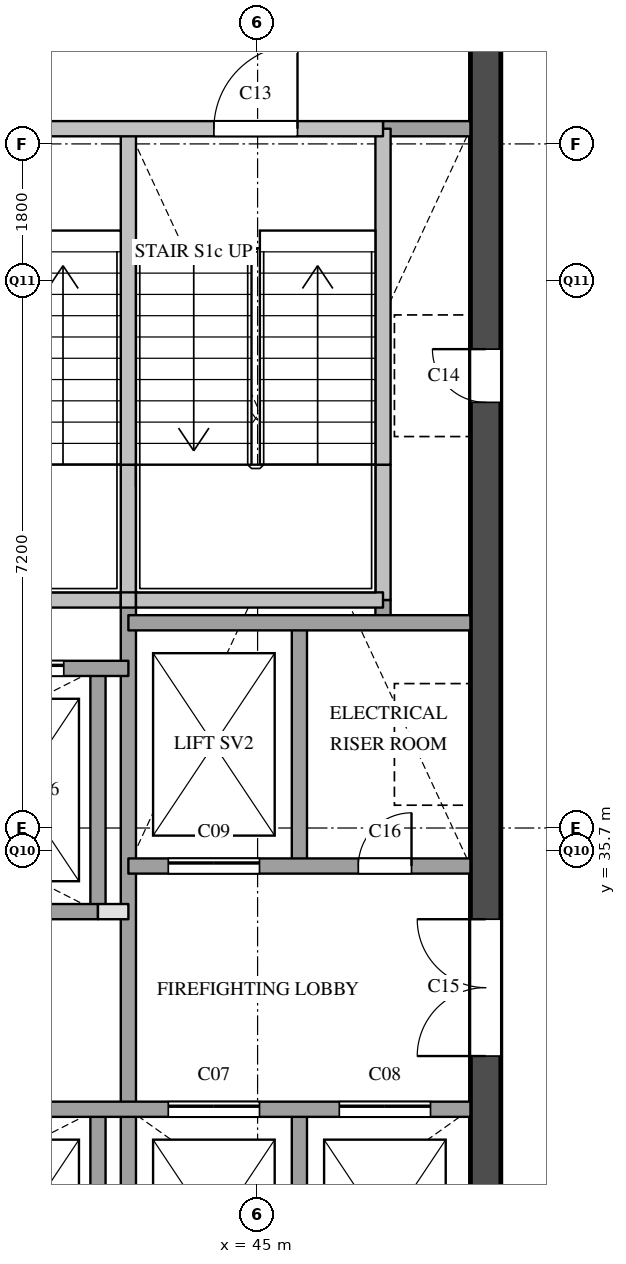
"""IFC4 building model, lengths in metres.
Left out: names, types, materials, properties, quantities, classifications, styles, units other than length and angle.
Written with IfcOpenShell. Run it as: python <this file> out.ifc"""

import sys

from ifc_helpers import new_model, si_unit, direction, frame, frame_2d, origin, place, context, subcontext, project, spatial, rectangle, extrude, element, fill, save


model = new_model("IFC4")
c1 = context("Model", 3, precision=1e-05, world=origin(), true_north=direction((0.0, 1.0)))
c2 = subcontext(c1, "Body", "Model", "MODEL_VIEW")
j1 = project(units=[si_unit("LENGTHUNIT", "METRE"), si_unit("PLANEANGLEUNIT", "RADIAN")], contexts=[c1])
p1 = place(None, origin())
s1 = spatial("IfcSite", under=j1, at=p1, CompositionType="ELEMENT")
p2 = place(p1, origin())
s2 = spatial("IfcBuilding", under=s1, at=p2, CompositionType="ELEMENT")
p3 = place(p2, frame((0.0, 0.0, 273.5)))
s3 = spatial("IfcBuildingStorey", under=s2, at=p3, CompositionType="ELEMENT", Elevation=273.5)
p4 = place(p3, frame((48.0, 29.1, 0.0), z_axis=(0.0, 0.0, 1.0), x_axis=(0.0, 1.0, 0.0)))
e1 = element("IfcWall", 1, at=p4, inside=s3, PredefinedType="SHEAR", context=c2, shape_type="SweptSolid", body=[
    extrude(rectangle(XDim=20.3, YDim=0.4, at=frame_2d((10.15, 0.0))), origin(), (0.0, 0.0, 1.0), 3.6),
])
p5 = place(p4, frame((12.5, 0.0, 0.0)))
e2 = element("IfcOpeningElement", 2, at=p5, cuts=e1, PredefinedType="OPENING", context=c2, shape_type="SweptSolid", body=[
    extrude(rectangle(XDim=0.7, YDim=2.1, at=frame_2d((0.35, 1.05))), frame((0.0, 0.21, 0.0), z_axis=(0.0, -1.0, 0.0), x_axis=(1.0, 0.0, 0.0)), (0.0, 0.0, 1.0), 0.42),
])
p6 = place(p4, frame((3.9, 0.0, 0.0)))
e3 = element("IfcOpeningElement", 3, at=p6, cuts=e1, PredefinedType="OPENING", context=c2, shape_type="SweptSolid", body=[
    extrude(rectangle(XDim=1.8, YDim=2.1, at=frame_2d((0.9, 1.05))), frame((0.0, 0.21, 0.0), z_axis=(0.0, -1.0, 0.0), x_axis=(1.0, 0.0, 0.0)), (0.0, 0.0, 1.0), 0.42),
])
p7 = place(p3, frame((42.9, 29.1, 0.0), z_axis=(0.0, 0.0, 1.0), x_axis=(0.0, 1.0, 0.0)))
e4 = element("IfcWall", 4, at=p7, inside=s3, PredefinedType="SOLIDWALL", context=c2, shape_type="SweptSolid", body=[
    extrude(rectangle(XDim=3.2, YDim=0.2, at=frame_2d((1.6, 0.0))), origin(), (0.0, 0.0, 1.0), 3.6),
])
p8 = place(p3, frame((42.9, 34.9, 0.0), z_axis=(0.0, 0.0, 1.0), x_axis=(0.0, 1.0, 0.0)))
e5 = element("IfcWall", 5, at=p8, inside=s3, PredefinedType="SOLIDWALL", context=c2, shape_type="SweptSolid", body=[
    extrude(rectangle(XDim=3.2, YDim=0.2, at=frame_2d((1.6, 0.0))), origin(), (0.0, 0.0, 1.0), 3.6),
])
p9 = place(p3, frame((43.3, 29.1, 0.0), z_axis=(0.0, 0.0, 1.0), x_axis=(0.0, 1.0, 0.0)))
e6 = element("IfcWall", 6, at=p9, inside=s3, PredefinedType="SOLIDWALL", context=c2, shape_type="SweptSolid", body=[
    extrude(rectangle(XDim=9.9, YDim=0.2, at=frame_2d((4.95, 0.0))), origin(), (0.0, 0.0, 1.0), 3.6),
])
p10 = place(p3, frame((43.3, 39.0, 0.0), z_axis=(0.0, 0.0, 1.0), x_axis=(0.0, 1.0, 0.0)))
e7 = element("IfcWall", 7, at=p10, inside=s3, PredefinedType="SOLIDWALL", context=c2, shape_type="SweptSolid", body=[
    extrude(rectangle(XDim=1.78, YDim=0.2, at=frame_2d((0.89, 0.0))), origin(), (0.0, 0.0, 1.0), 3.6),
])
p11 = place(p3, frame((43.3, 40.78, 0.0), z_axis=(0.0, 0.0, 1.0), x_axis=(0.0, 1.0, 0.0)))
e8 = element("IfcWall", 8, at=p11, inside=s3, PredefinedType="SOLIDWALL", context=c2, shape_type="SweptSolid", body=[
    extrude(rectangle(XDim=4.42, YDim=0.2, at=frame_2d((2.21, 0.0))), origin(), (0.0, 0.0, 1.0), 3.6),
])
for number, where, z_axis, x_axis in (
    (9, (45.55, 29.1, 0.0), (0.0, 0.0, 1.0), (0.0, 1.0, 0.0)),
    (10, (45.55, 35.5, 0.0), (0.0, 0.0, 1.0), (0.0, 1.0, 0.0)),
):
    element("IfcWall", number, at=place(p3, frame(where, z_axis=z_axis, x_axis=x_axis)), inside=s3, PredefinedType="SOLIDWALL", context=c2, shape_type="SweptSolid", body=[
        extrude(rectangle(XDim=3.2, YDim=0.2, at=frame_2d((1.6, 0.0))), origin(), (0.0, 0.0, 1.0), 3.6),
    ])
p12 = place(p3, frame((46.65, 38.7, 0.0), z_axis=(0.0, 0.0, 1.0), x_axis=(0.0, 1.0, 0.0)))
e11 = element("IfcWall", 11, at=p12, inside=s3, PredefinedType="SOLIDWALL", context=c2, shape_type="SweptSolid", body=[
    extrude(rectangle(XDim=0.3, YDim=0.2, at=frame_2d((0.15, 0.0))), origin(), (0.0, 0.0, 1.0), 3.6),
])
p13 = place(p3, frame((46.65, 39.0, 0.0), z_axis=(0.0, 0.0, 1.0), x_axis=(0.0, 1.0, 0.0)))
e12 = element("IfcWall", 12, at=p13, inside=s3, PredefinedType="SOLIDWALL", context=c2, shape_type="SweptSolid", body=[
    extrude(rectangle(XDim=1.78, YDim=0.2, at=frame_2d((0.89, 0.0))), origin(), (0.0, 0.0, 1.0), 3.6),
])
p14 = place(p3, frame((46.65, 40.78, 0.0), z_axis=(0.0, 0.0, 1.0), x_axis=(0.0, 1.0, 0.0)))
e13 = element("IfcWall", 13, at=p14, inside=s3, PredefinedType="SOLIDWALL", context=c2, shape_type="SweptSolid", body=[
    extrude(rectangle(XDim=4.42, YDim=0.2, at=frame_2d((2.21, 0.0))), origin(), (0.0, 0.0, 1.0), 3.6),
])
p15 = place(p3, frame((36.6, 32.3, 0.0), z_axis=(0.0, 0.0, 1.0), x_axis=(1.0, 0.0, 0.0)))
e14 = element("IfcWall", 14, at=p15, inside=s3, PredefinedType="SOLIDWALL", context=c2, shape_type="SweptSolid", body=[
    extrude(rectangle(XDim=11.2, YDim=0.2, at=frame_2d((5.6, 0.0))), origin(), (0.0, 0.0, 1.0), 3.6),
])
p16 = place(p15, frame((7.225, 0.0, 0.0)))
e15 = element("IfcOpeningElement", 15, at=p16, cuts=e14, PredefinedType="OPENING", context=c2, shape_type="SweptSolid", body=[
    extrude(rectangle(XDim=1.2, YDim=2.1, at=frame_2d((0.6, 1.05))), frame((0.0, 0.11, 0.0), z_axis=(0.0, -1.0, 0.0), x_axis=(1.0, 0.0, 0.0)), (0.0, 0.0, 1.0), 0.22),
])
p17 = place(p15, frame((9.475, 0.0, 0.0)))
e16 = element("IfcOpeningElement", 16, at=p17, cuts=e14, PredefinedType="OPENING", context=c2, shape_type="SweptSolid", body=[
    extrude(rectangle(XDim=1.2, YDim=2.1, at=frame_2d((0.6, 1.05))), frame((0.0, 0.11, 0.0), z_axis=(0.0, -1.0, 0.0), x_axis=(1.0, 0.0, 0.0)), (0.0, 0.0, 1.0), 0.22),
])
p18 = place(p3, frame((42.9, 34.9, 0.0), z_axis=(0.0, 0.0, 1.0), x_axis=(1.0, 0.0, 0.0)))
e17 = element("IfcWall", 17, at=p18, inside=s3, PredefinedType="PARTITIONING", context=c2, shape_type="SweptSolid", body=[
    extrude(rectangle(XDim=0.4, YDim=0.2, at=frame_2d((0.2, 0.0))), origin(), (0.0, 0.0, 1.0), 3.6),
])
p19 = place(p3, frame((36.6, 34.9, 0.0), z_axis=(0.0, 0.0, 1.0), x_axis=(1.0, 0.0, 0.0)))
e18 = element("IfcWall", 18, at=p19, inside=s3, PredefinedType="SOLIDWALL", context=c2, shape_type="SweptSolid", body=[
    extrude(rectangle(XDim=6.3, YDim=0.2, at=frame_2d((3.15, 0.0))), origin(), (0.0, 0.0, 1.0), 3.6),
])
p20 = place(p3, frame((43.3, 35.5, 0.0), z_axis=(0.0, 0.0, 1.0), x_axis=(1.0, 0.0, 0.0)))
e19 = element("IfcWall", 19, at=p20, inside=s3, PredefinedType="SOLIDWALL", context=c2, shape_type="SweptSolid", body=[
    extrude(rectangle(XDim=4.5, YDim=0.2, at=frame_2d((2.25, 0.0))), origin(), (0.0, 0.0, 1.0), 3.6),
])
p21 = place(p20, frame((0.525, 0.0, 0.0)))
e20 = element("IfcOpeningElement", 20, at=p21, cuts=e19, PredefinedType="OPENING", context=c2, shape_type="SweptSolid", body=[
    extrude(rectangle(XDim=1.2, YDim=2.1, at=frame_2d((0.6, 1.05))), frame((0.0, 0.11, 0.0), z_axis=(0.0, -1.0, 0.0), x_axis=(1.0, 0.0, 0.0)), (0.0, 0.0, 1.0), 0.22),
])
p22 = place(p20, frame((3.025, 0.0, 0.0)))
e21 = element("IfcOpeningElement", 21, at=p22, cuts=e19, PredefinedType="OPENING", context=c2, shape_type="SweptSolid", body=[
    extrude(rectangle(XDim=0.7, YDim=2.1, at=frame_2d((0.35, 1.05))), frame((0.0, 0.11, 0.0), z_axis=(0.0, -1.0, 0.0), x_axis=(1.0, 0.0, 0.0)), (0.0, 0.0, 1.0), 0.22),
])
p23 = place(p3, frame((36.6, 38.1, 0.0), z_axis=(0.0, 0.0, 1.0), x_axis=(1.0, 0.0, 0.0)))
e22 = element("IfcWall", 22, at=p23, inside=s3, PredefinedType="SOLIDWALL", context=c2, shape_type="SweptSolid", body=[
    extrude(rectangle(XDim=6.7, YDim=0.2, at=frame_2d((3.35, 0.0))), origin(), (0.0, 0.0, 1.0), 3.6),
])
p24 = place(p23, frame((0.45, 0.0, 0.0)))
e23 = element("IfcOpeningElement", 23, at=p24, cuts=e22, PredefinedType="OPENING", context=c2, shape_type="SweptSolid", body=[
    extrude(rectangle(XDim=1.2, YDim=2.1, at=frame_2d((0.6, 1.05))), frame((0.0, 0.11, 0.0), z_axis=(0.0, -1.0, 0.0), x_axis=(1.0, 0.0, 0.0)), (0.0, 0.0, 1.0), 0.22),
])
p25 = place(p23, frame((2.55, 0.0, 0.0)))
e24 = element("IfcOpeningElement", 24, at=p25, cuts=e22, PredefinedType="OPENING", context=c2, shape_type="SweptSolid", body=[
    extrude(rectangle(XDim=1.2, YDim=2.1, at=frame_2d((0.6, 1.05))), frame((0.0, 0.11, 0.0), z_axis=(0.0, -1.0, 0.0), x_axis=(1.0, 0.0, 0.0)), (0.0, 0.0, 1.0), 0.22),
])
p26 = place(p23, frame((4.65, 0.0, 0.0)))
e25 = element("IfcOpeningElement", 25, at=p26, cuts=e22, PredefinedType="OPENING", context=c2, shape_type="SweptSolid", body=[
    extrude(rectangle(XDim=1.2, YDim=2.1, at=frame_2d((0.6, 1.05))), frame((0.0, 0.11, 0.0), z_axis=(0.0, -1.0, 0.0), x_axis=(1.0, 0.0, 0.0)), (0.0, 0.0, 1.0), 0.22),
])
p27 = place(p3, frame((43.3, 38.7, 0.0), z_axis=(0.0, 0.0, 1.0), x_axis=(1.0, 0.0, 0.0)))
e26 = element("IfcWall", 26, at=p27, inside=s3, PredefinedType="SOLIDWALL", context=c2, shape_type="SweptSolid", body=[
    extrude(rectangle(XDim=4.5, YDim=0.2, at=frame_2d((2.25, 0.0))), origin(), (0.0, 0.0, 1.0), 3.6),
])
p28 = place(p3, frame((40.05, 39.0, 0.0), z_axis=(0.0, 0.0, 1.0), x_axis=(1.0, 0.0, 0.0)))
e27 = element("IfcWall", 27, at=p28, inside=s3, PredefinedType="SOLIDWALL", context=c2, shape_type="SweptSolid", body=[
    extrude(rectangle(XDim=3.15, YDim=0.2, at=frame_2d((1.575, 0.0))), origin(), (0.0, 0.0, 1.0), 3.6),
])
p29 = place(p3, frame((43.2, 39.0, 0.0), z_axis=(0.0, 0.0, 1.0), x_axis=(1.0, 0.0, 0.0)))
e28 = element("IfcWall", 28, at=p29, inside=s3, PredefinedType="SOLIDWALL", context=c2, shape_type="SweptSolid", body=[
    extrude(rectangle(XDim=0.2, YDim=0.2, at=frame_2d((0.1, 0.0))), origin(), (0.0, 0.0, 1.0), 3.6),
])
p30 = place(p3, frame((43.4, 39.0, 0.0), z_axis=(0.0, 0.0, 1.0), x_axis=(1.0, 0.0, 0.0)))
e29 = element("IfcWall", 29, at=p30, inside=s3, PredefinedType="SOLIDWALL", context=c2, shape_type="SweptSolid", body=[
    extrude(rectangle(XDim=3.25, YDim=0.2, at=frame_2d((1.625, 0.0))), origin(), (0.0, 0.0, 1.0), 3.6),
])
p31 = place(p3, frame((46.65, 45.2, 0.0), z_axis=(0.0, 0.0, 1.0), x_axis=(1.0, 0.0, 0.0)))
e30 = element("IfcWall", 30, at=p31, inside=s3, PredefinedType="SOLIDWALL", context=c2, shape_type="SweptSolid", body=[
    extrude(rectangle(XDim=1.15, YDim=0.2, at=frame_2d((0.575, 0.0))), origin(), (0.0, 0.0, 1.0), 3.6),
])
p32 = place(p3, frame((36.6, 45.2, 0.0), z_axis=(0.0, 0.0, 1.0), x_axis=(1.0, 0.0, 0.0)))
e31 = element("IfcWall", 31, at=p32, inside=s3, PredefinedType="SOLIDWALL", context=c2, shape_type="SweptSolid", body=[
    extrude(rectangle(XDim=10.05, YDim=0.2, at=frame_2d((5.025, 0.0))), origin(), (0.0, 0.0, 1.0), 3.6),
])
p33 = place(p32, frame((1.125, 0.0, 0.0)))
e32 = element("IfcOpeningElement", 32, at=p33, cuts=e31, PredefinedType="OPENING", context=c2, shape_type="SweptSolid", body=[
    extrude(rectangle(XDim=1.1, YDim=2.1, at=frame_2d((0.55, 1.05))), frame((0.0, 0.11, 0.0), z_axis=(0.0, -1.0, 0.0), x_axis=(1.0, 0.0, 0.0)), (0.0, 0.0, 1.0), 0.22),
])
p34 = place(p32, frame((4.475, 0.0, 0.0)))
e33 = element("IfcOpeningElement", 33, at=p34, cuts=e31, PredefinedType="OPENING", context=c2, shape_type="SweptSolid", body=[
    extrude(rectangle(XDim=1.1, YDim=2.1, at=frame_2d((0.55, 1.05))), frame((0.0, 0.11, 0.0), z_axis=(0.0, -1.0, 0.0), x_axis=(1.0, 0.0, 0.0)), (0.0, 0.0, 1.0), 0.22),
])
p35 = place(p32, frame((7.825, 0.0, 0.0)))
e34 = element("IfcOpeningElement", 34, at=p35, cuts=e31, PredefinedType="OPENING", context=c2, shape_type="SweptSolid", body=[
    extrude(rectangle(XDim=1.1, YDim=2.1, at=frame_2d((0.55, 1.05))), frame((0.0, 0.11, 0.0), z_axis=(0.0, -1.0, 0.0), x_axis=(1.0, 0.0, 0.0)), (0.0, 0.0, 1.0), 0.22),
])
p36 = place(p26, origin())
e35 = element("IfcDoor", 35, at=p36, inside=s3, OperationType="SLIDING_TO_LEFT", PredefinedType="DOOR", context=c2, shape_type="SweptSolid", body=[
    extrude(rectangle(XDim=1.2, YDim=2.1, at=frame_2d((0.6, 1.05))), frame((0.0, 0.025, 0.0), z_axis=(0.0, -1.0, 0.0), x_axis=(1.0, 0.0, 0.0)), (0.0, 0.0, 1.0), 0.05),
])
fill(e25, e35)
p37 = place(p16, origin())
e36 = element("IfcDoor", 36, at=p37, inside=s3, OperationType="SLIDING_TO_LEFT", PredefinedType="DOOR", context=c2, shape_type="SweptSolid", body=[
    extrude(rectangle(XDim=1.2, YDim=2.1, at=frame_2d((0.6, 1.05))), frame((0.0, 0.025, 0.0), z_axis=(0.0, -1.0, 0.0), x_axis=(1.0, 0.0, 0.0)), (0.0, 0.0, 1.0), 0.05),
])
fill(e15, e36)
p38 = place(p17, origin())
e37 = element("IfcDoor", 37, at=p38, inside=s3, OperationType="SLIDING_TO_LEFT", PredefinedType="DOOR", context=c2, shape_type="SweptSolid", body=[
    extrude(rectangle(XDim=1.2, YDim=2.1, at=frame_2d((0.6, 1.05))), frame((0.0, 0.025, 0.0), z_axis=(0.0, -1.0, 0.0), x_axis=(1.0, 0.0, 0.0)), (0.0, 0.0, 1.0), 0.05),
])
fill(e16, e37)
p39 = place(p21, origin())
e38 = element("IfcDoor", 38, at=p39, inside=s3, OperationType="SLIDING_TO_LEFT", PredefinedType="DOOR", context=c2, shape_type="SweptSolid", body=[
    extrude(rectangle(XDim=1.2, YDim=2.1, at=frame_2d((0.6, 1.05))), frame((0.0, 0.025, 0.0), z_axis=(0.0, -1.0, 0.0), x_axis=(1.0, 0.0, 0.0)), (0.0, 0.0, 1.0), 0.05),
])
fill(e20, e38)
p40 = place(p35, origin())
e39 = element("IfcDoor", 39, at=p40, inside=s3, OperationType="SINGLE_SWING_RIGHT", PredefinedType="DOOR", context=c2, shape_type="SweptSolid", body=[
    extrude(rectangle(XDim=1.1, YDim=2.1, at=frame_2d((0.55, 1.05))), frame((0.0, 0.025, 0.0), z_axis=(0.0, -1.0, 0.0), x_axis=(1.0, 0.0, 0.0)), (0.0, 0.0, 1.0), 0.05),
])
fill(e34, e39)
p41 = place(p5, origin())
e40 = element("IfcDoor", 40, at=p41, inside=s3, OperationType="SINGLE_SWING_RIGHT", PredefinedType="DOOR", context=c2, shape_type="SweptSolid", body=[
    extrude(rectangle(XDim=0.7, YDim=2.1, at=frame_2d((0.35, 1.05))), frame((0.0, 0.025, 0.0), z_axis=(0.0, -1.0, 0.0), x_axis=(1.0, 0.0, 0.0)), (0.0, 0.0, 1.0), 0.05),
])
fill(e2, e40)
p42 = place(p6, origin())
e41 = element("IfcDoor", 41, at=p42, inside=s3, OperationType="DOUBLE_DOOR_SINGLE_SWING", PredefinedType="DOOR", context=c2, shape_type="SweptSolid", body=[
    extrude(rectangle(XDim=1.8, YDim=2.1, at=frame_2d((0.9, 1.05))), frame((0.0, 0.025, 0.0), z_axis=(0.0, -1.0, 0.0), x_axis=(1.0, 0.0, 0.0)), (0.0, 0.0, 1.0), 0.05),
])
fill(e3, e41)
p43 = place(p22, origin())
e42 = element("IfcDoor", 42, at=p43, inside=s3, OperationType="SINGLE_SWING_RIGHT", PredefinedType="DOOR", context=c2, shape_type="SweptSolid", body=[
    extrude(rectangle(XDim=0.7, YDim=2.1, at=frame_2d((0.35, 1.05))), frame((0.0, 0.025, 0.0), z_axis=(0.0, -1.0, 0.0), x_axis=(1.0, 0.0, 0.0)), (0.0, 0.0, 1.0), 0.05),
])
fill(e21, e42)
save(model, sys.argv[1])
